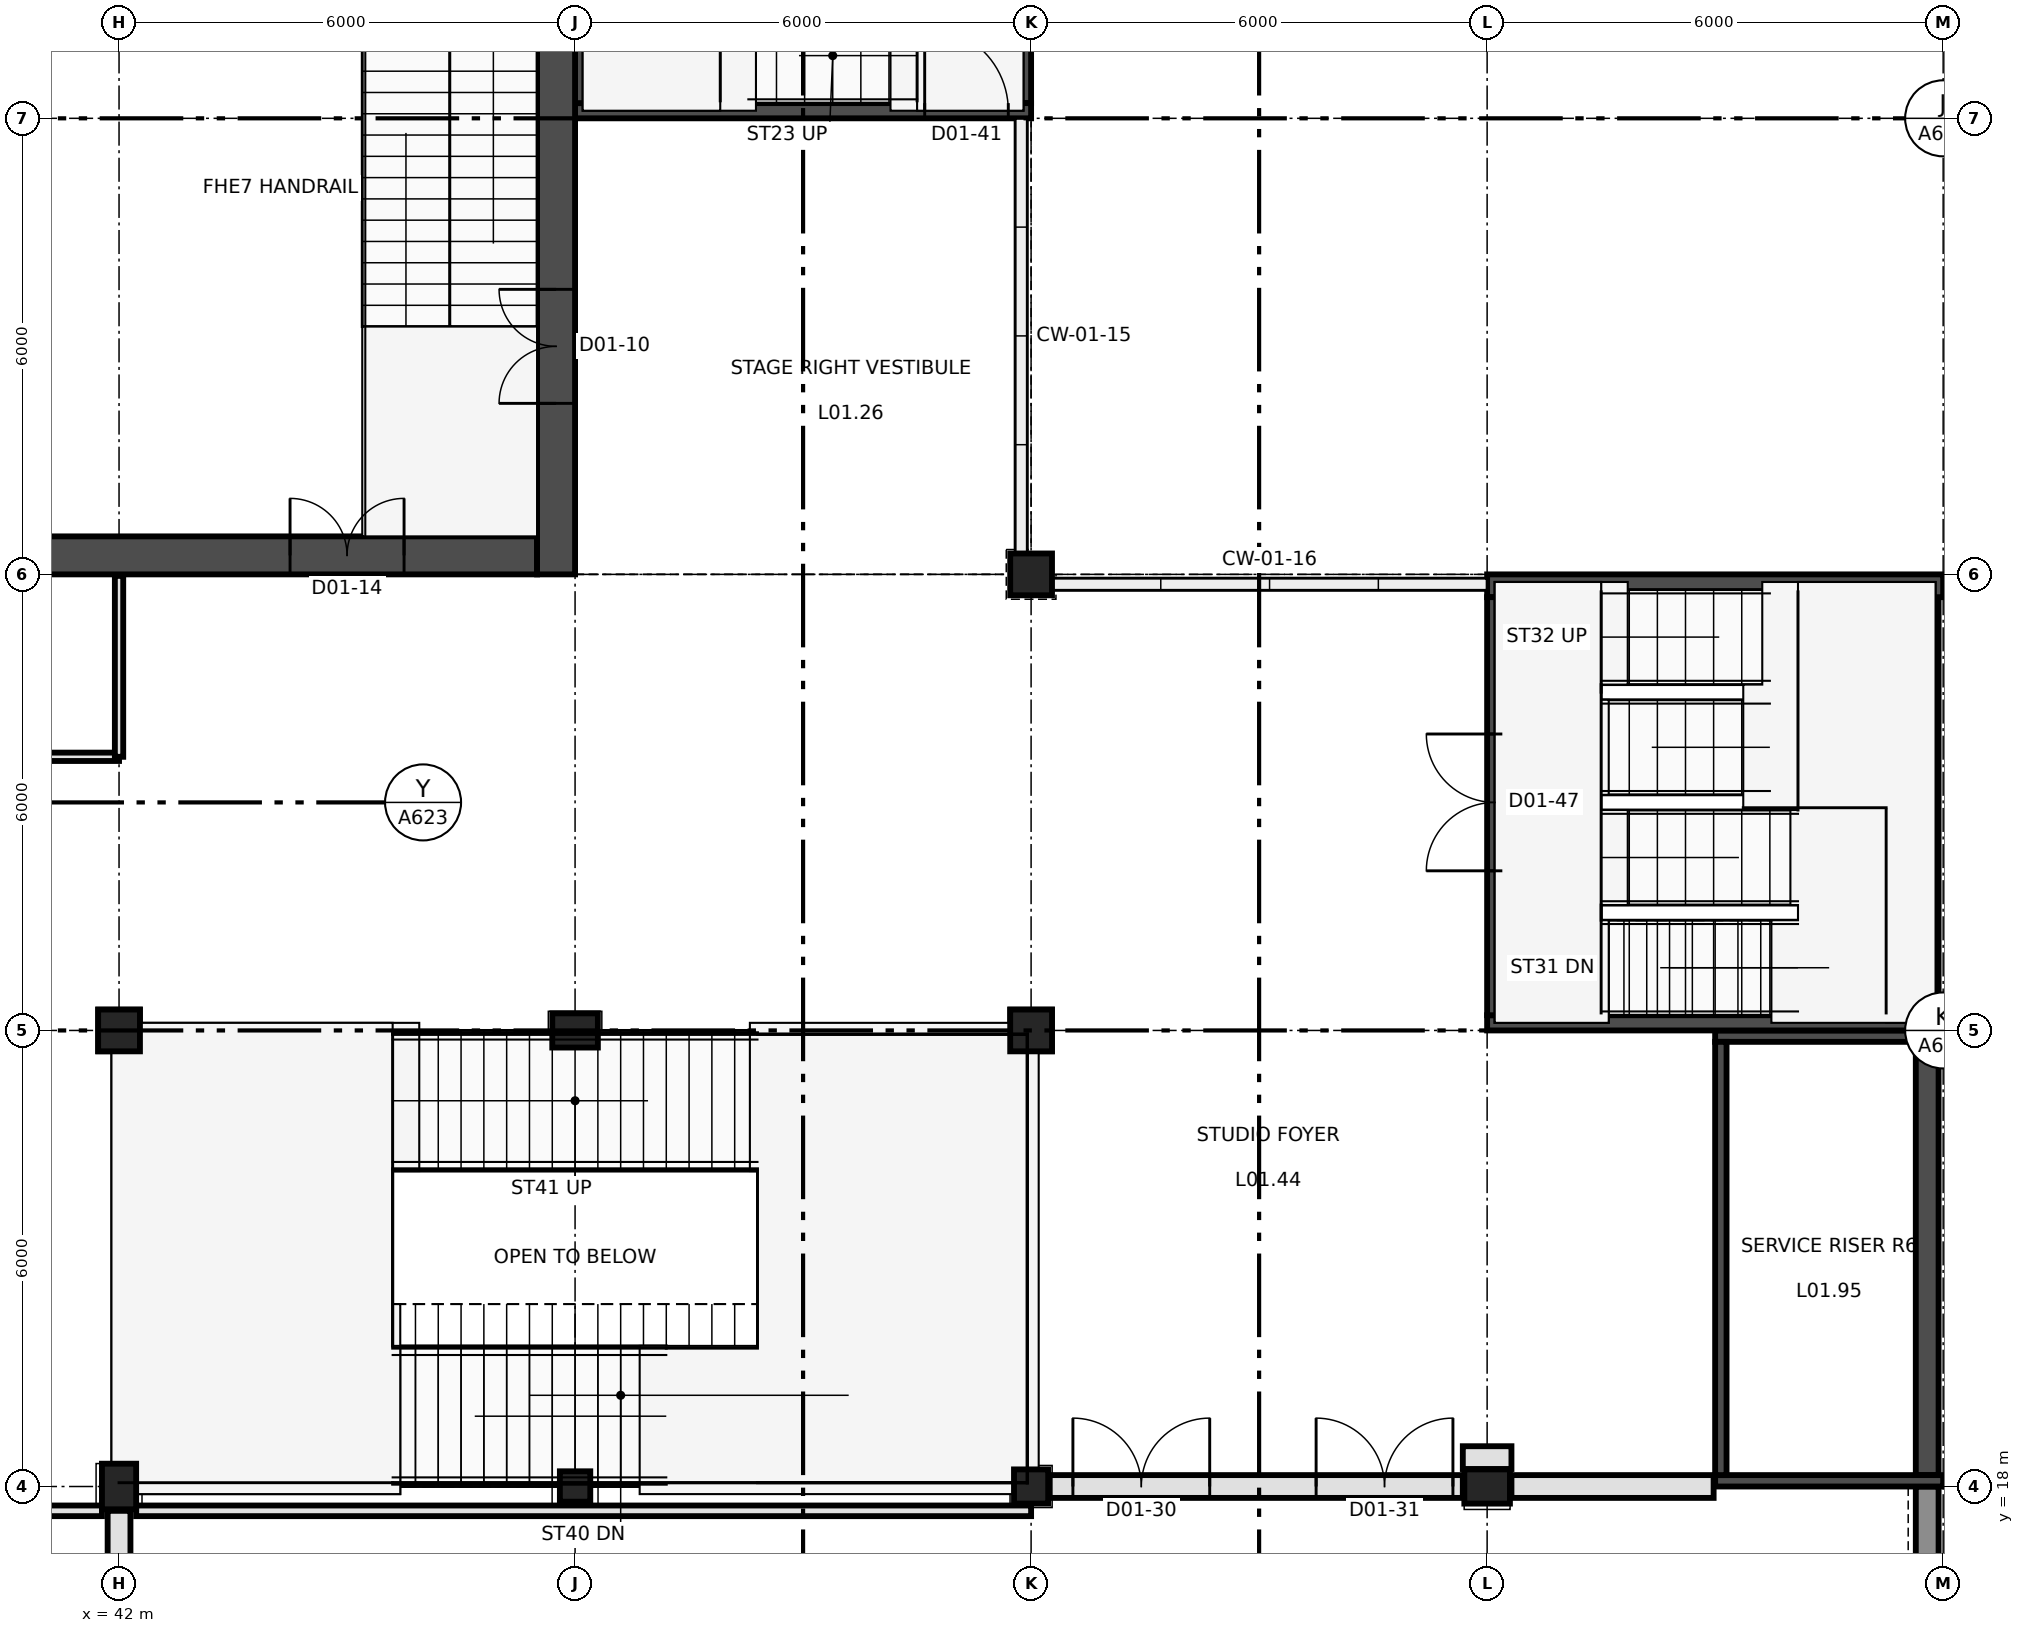
"""IFC4 building model, lengths in metres.
Left out: names, types, materials, properties, quantities, classifications, styles, units other than length and angle.
Written with IfcOpenShell. Run it as: python <this file> out.ifc"""

import sys

from ifc_helpers import new_model, si_unit, direction, frame, frame_2d, origin, origin_2d, place, context, subcontext, project, spatial, rectangle, extrude, element, fill, save


model = new_model("IFC4")
c1 = context("Model", 3, precision=1e-05, world=origin(), true_north=direction((0.0, 1.0)))
c2 = subcontext(c1, "Body", "Model", "MODEL_VIEW")
j1 = project(units=[si_unit("LENGTHUNIT", "METRE"), si_unit("PLANEANGLEUNIT", "RADIAN")], contexts=[c1])
p1 = place(None, origin())
s1 = spatial("IfcSite", under=j1, at=p1, CompositionType="ELEMENT")
p2 = place(p1, origin())
s2 = spatial("IfcBuilding", under=s1, at=p2, CompositionType="ELEMENT")
p3 = place(p2, frame((0.0, 0.0, 7.0)))
s3 = spatial("IfcBuildingStorey", under=s2, at=p3, CompositionType="ELEMENT", Elevation=7.0)
p4 = place(p3, frame((42.0, 18.0, 0.0), z_axis=(0.0, 0.0, 1.0), x_axis=(1.0, 0.0, 0.0)))
e1 = element("IfcColumn", 1, at=p4, inside=s3, PredefinedType="COLUMN", context=c2, shape_type="SweptSolid", body=[
    extrude(rectangle(XDim=0.45, YDim=0.6, at=origin_2d()), origin(), (0.0, 0.0, 1.0), 5.0),
])
p5 = place(p3, frame((48.0, 18.0, 0.0), z_axis=(0.0, 0.0, 1.0), x_axis=(1.0, 0.0, 0.0)))
e2 = element("IfcColumn", 2, at=p5, inside=s3, PredefinedType="COLUMN", context=c2, shape_type="SweptSolid", body=[
    extrude(rectangle(XDim=0.4, YDim=0.4, at=origin_2d()), origin(), (0.0, 0.0, 1.0), 5.0),
])
p6 = place(p3, frame((54.0, 18.0, 0.0), z_axis=(0.0, 0.0, 1.0), x_axis=(1.0, 0.0, 0.0)))
e3 = element("IfcColumn", 3, at=p6, inside=s3, PredefinedType="COLUMN", context=c2, shape_type="SweptSolid", body=[
    extrude(rectangle(XDim=0.45, YDim=0.45, at=origin_2d()), origin(), (0.0, 0.0, 1.0), 5.0),
])
p7 = place(p3, frame((60.0, 18.0, 0.0), z_axis=(0.0, 0.0, 1.0), x_axis=(1.0, 0.0, 0.0)))
e4 = element("IfcColumn", 4, at=p7, inside=s3, PredefinedType="COLUMN", context=c2, shape_type="SweptSolid", body=[
    extrude(rectangle(XDim=0.6, YDim=0.45, at=origin_2d()), origin(), (0.0, 0.0, 1.0), 5.0),
])
p8 = place(p3, frame((42.0, 24.0, 0.0), z_axis=(0.0, 0.0, 1.0), x_axis=(1.0, 0.0, 0.0)))
e5 = element("IfcColumn", 5, at=p8, inside=s3, PredefinedType="COLUMN", context=c2, shape_type="SweptSolid", body=[
    extrude(rectangle(XDim=0.55, YDim=0.55, at=origin_2d()), origin(), (0.0, 0.0, 1.0), 5.0),
])
p9 = place(p3, frame((48.0, 24.0, 0.0), z_axis=(0.0, 0.0, 1.0), x_axis=(1.0, 0.0, 0.0)))
e6 = element("IfcColumn", 6, at=p9, inside=s3, PredefinedType="COLUMN", context=c2, shape_type="SweptSolid", body=[
    extrude(rectangle(XDim=0.6, YDim=0.45, at=origin_2d()), origin(), (0.0, 0.0, 1.0), 5.0),
])
for number, where, z_axis, x_axis in (
    (7, (54.0, 24.0, 0.0), (0.0, 0.0, 1.0), (1.0, 0.0, 0.0)),
    (8, (54.0, 30.0, 0.0), (0.0, 0.0, 1.0), (1.0, 0.0, 0.0)),
):
    element("IfcColumn", number, at=place(p3, frame(where, z_axis=z_axis, x_axis=x_axis)), inside=s3, PredefinedType="COLUMN", context=c2, shape_type="SweptSolid", body=[
        extrude(rectangle(XDim=0.55, YDim=0.55, at=origin_2d()), origin(), (0.0, 0.0, 1.0), 5.0),
    ])
p10 = place(p3, frame((48.0, 36.1, 0.0), z_axis=(0.0, 0.0, 1.0), x_axis=(1.0, 0.0, 0.0)))
e9 = element("IfcWall", 9, at=p10, inside=s3, PredefinedType="SHEAR", context=c2, shape_type="SweptSolid", body=[
    extrude(rectangle(XDim=6.0, YDim=0.2, at=frame_2d((3.0, 0.0))), origin(), (0.0, 0.0, 1.0), 5.0),
])
p11 = place(p10, frame((4.6, 0.0, 0.0)))
e10 = element("IfcOpeningElement", 10, at=p11, cuts=e9, PredefinedType="OPENING", context=c2, shape_type="SweptSolid", body=[
    extrude(rectangle(XDim=1.1, YDim=2.2, at=frame_2d((0.55, 1.1))), frame((0.0, 0.11, 0.0), z_axis=(0.0, -1.0, 0.0), x_axis=(1.0, 0.0, 0.0)), (0.0, 0.0, 1.0), 0.22),
])
for number, where, z_axis, x_axis in (
    (11, (48.1, 36.2, 0.0), (0.0, 0.0, 1.0), (0.0, 1.0, 0.0)),
    (12, (53.9, 36.2, 0.0), (0.0, 0.0, 1.0), (0.0, 1.0, 0.0)),
):
    element("IfcWall", number, at=place(p3, frame(where, z_axis=z_axis, x_axis=x_axis)), inside=s3, PredefinedType="SHEAR", context=c2, shape_type="SweptSolid", body=[
        extrude(rectangle(XDim=5.6, YDim=0.2, at=frame_2d((2.8, 0.0))), origin(), (0.0, 0.0, 1.0), 5.0),
    ])
p12 = place(p3, frame((60.0, 29.85, 0.0), z_axis=(0.0, 0.0, 1.0), x_axis=(1.0, 0.0, 0.0)))
e13 = element("IfcWall", 13, at=p12, inside=s3, PredefinedType="SHEAR", context=c2, shape_type="SweptSolid", body=[
    extrude(rectangle(XDim=6.0, YDim=0.3, at=frame_2d((3.0, 0.0))), origin(), (0.0, 0.0, 1.0), 5.0),
])
p13 = place(p3, frame((60.0, 24.1, 0.0), z_axis=(0.0, 0.0, 1.0), x_axis=(1.0, 0.0, 0.0)))
e14 = element("IfcWall", 14, at=p13, inside=s3, PredefinedType="SHEAR", context=c2, shape_type="SweptSolid", body=[
    extrude(rectangle(XDim=6.0, YDim=0.2, at=frame_2d((3.0, 0.0))), origin(), (0.0, 0.0, 1.0), 5.0),
])
p14 = place(p3, frame((60.1, 24.2, 0.0), z_axis=(0.0, 0.0, 1.0), x_axis=(0.0, 1.0, 0.0)))
e15 = element("IfcWall", 15, at=p14, inside=s3, PredefinedType="SHEAR", context=c2, shape_type="SweptSolid", body=[
    extrude(rectangle(XDim=5.5, YDim=0.2, at=frame_2d((2.75, 0.0))), origin(), (0.0, 0.0, 1.0), 5.0),
])
p15 = place(p14, frame((1.9, 0.0, 0.0)))
e16 = element("IfcOpeningElement", 16, at=p15, cuts=e15, PredefinedType="OPENING", context=c2, shape_type="SweptSolid", body=[
    extrude(rectangle(XDim=1.8, YDim=2.2, at=frame_2d((0.9, 1.1))), frame((0.0, 0.11, 0.0), z_axis=(0.0, -1.0, 0.0), x_axis=(1.0, 0.0, 0.0)), (0.0, 0.0, 1.0), 0.22),
])
p16 = place(p3, frame((65.79, 24.2, 0.0), z_axis=(0.0, 0.0, 1.0), x_axis=(0.0, 1.0, 0.0)))
e17 = element("IfcWall", 17, at=p16, inside=s3, PredefinedType="SHEAR", context=c2, shape_type="SweptSolid", body=[
    extrude(rectangle(XDim=5.5, YDim=0.3, at=frame_2d((2.75, 0.0))), origin(), (0.0, 0.0, 1.0), 5.0),
])
for number, where, z_axis, x_axis in (
    (18, (63.0, 23.925, 0.0), (0.0, 0.0, 1.0), (1.0, 0.0, 0.0)),
    (19, (63.0, 18.075, 0.0), (0.0, 0.0, 1.0), (1.0, 0.0, 0.0)),
):
    element("IfcWall", number, at=place(p3, frame(where, z_axis=z_axis, x_axis=x_axis)), inside=s3, PredefinedType="SHEAR", context=c2, shape_type="SweptSolid", body=[
        extrude(rectangle(XDim=3.0, YDim=0.15, at=frame_2d((1.5, 0.0))), origin(), (0.0, 0.0, 1.0), 5.0),
    ])
p17 = place(p3, frame((63.075, 18.15, 0.0), z_axis=(0.0, 0.0, 1.0), x_axis=(0.0, 1.0, 0.0)))
e20 = element("IfcWall", 20, at=p17, inside=s3, PredefinedType="SHEAR", context=c2, shape_type="SweptSolid", body=[
    extrude(rectangle(XDim=5.7, YDim=0.15, at=frame_2d((2.85, 0.0))), origin(), (0.0, 0.0, 1.0), 5.0),
])
p18 = place(p3, frame((65.79, 18.15, 0.0), z_axis=(0.0, 0.0, 1.0), x_axis=(0.0, 1.0, 0.0)))
e21 = element("IfcWall", 21, at=p18, inside=s3, PredefinedType="SHEAR", context=c2, shape_type="SweptSolid", body=[
    extrude(rectangle(XDim=5.7, YDim=0.3, at=frame_2d((2.85, 0.0))), origin(), (0.0, 0.0, 1.0), 5.0),
])
p19 = place(p3, frame((65.79, 0.0, 0.0), z_axis=(0.0, 0.0, 1.0), x_axis=(0.0, 1.0, 0.0)))
e22 = element("IfcWall", 22, at=p19, inside=s3, PredefinedType="SOLIDWALL", context=c2, shape_type="SweptSolid", body=[
    extrude(rectangle(XDim=18.0, YDim=0.3, at=frame_2d((9.0, 0.0))), origin(), (0.0, 0.0, 1.0), 5.0),
])
p20 = place(p3, frame((47.75, 30.0, 0.0), z_axis=(0.0, 0.0, 1.0), x_axis=(0.0, 1.0, 0.0)))
e23 = element("IfcWall", 23, at=p20, inside=s3, PredefinedType="SHEAR", context=c2, shape_type="SweptSolid", body=[
    extrude(rectangle(XDim=24.0, YDim=0.5, at=frame_2d((12.0, 0.0))), origin(), (0.0, 0.0, 1.0), 5.0),
])
p21 = place(p20, frame((2.25, 0.0, 0.0)))
e24 = element("IfcOpeningElement", 24, at=p21, cuts=e23, PredefinedType="OPENING", context=c2, shape_type="SweptSolid", body=[
    extrude(rectangle(XDim=1.5, YDim=2.1, at=frame_2d((0.75, 1.05))), frame((0.0, 0.26, 0.0), z_axis=(0.0, -1.0, 0.0), x_axis=(1.0, 0.0, 0.0)), (0.0, 0.0, 1.0), 0.52),
])
p22 = place(p20, frame((14.25, 0.0, 0.0)))
e25 = element("IfcOpeningElement", 25, at=p22, cuts=e23, PredefinedType="OPENING", context=c2, shape_type="SweptSolid", body=[
    extrude(rectangle(XDim=1.5, YDim=2.1, at=frame_2d((0.75, 1.05))), frame((0.0, 0.26, 0.0), z_axis=(0.0, -1.0, 0.0), x_axis=(1.0, 0.0, 0.0)), (0.0, 0.0, 1.0), 0.52),
])
p23 = place(p3, frame((18.5, 30.25, 0.0), z_axis=(0.0, 0.0, 1.0), x_axis=(1.0, 0.0, 0.0)))
e26 = element("IfcWall", 26, at=p23, inside=s3, PredefinedType="SHEAR", context=c2, shape_type="SweptSolid", body=[
    extrude(rectangle(XDim=29.0, YDim=0.5, at=frame_2d((14.5, 0.0))), origin(), (0.0, 0.0, 1.0), 5.0),
])
p24 = place(p23, frame((1.25, 0.0, 0.0)))
e27 = element("IfcOpeningElement", 27, at=p24, cuts=e26, PredefinedType="OPENING", context=c2, shape_type="SweptSolid", body=[
    extrude(rectangle(XDim=2.4, YDim=3.6, at=frame_2d((1.2, 1.8))), frame((0.0, 0.26, 0.0), z_axis=(0.0, -1.0, 0.0), x_axis=(1.0, 0.0, 0.0)), (0.0, 0.0, 1.0), 0.52),
])
p25 = place(p23, frame((25.75, 0.0, 0.0)))
e28 = element("IfcOpeningElement", 28, at=p25, cuts=e26, PredefinedType="OPENING", context=c2, shape_type="SweptSolid", body=[
    extrude(rectangle(XDim=1.5, YDim=2.1, at=frame_2d((0.75, 1.05))), frame((0.0, 0.26, 0.0), z_axis=(0.0, -1.0, 0.0), x_axis=(1.0, 0.0, 0.0)), (0.0, 0.0, 1.0), 0.52),
])
p26 = place(p3, frame((54.245, 18.0, 0.0), z_axis=(0.0, 0.0, 1.0), x_axis=(1.0, 0.0, 0.0)))
e29 = element("IfcWall", 29, at=p26, inside=s3, PredefinedType="PARTITIONING", context=c2, shape_type="SweptSolid", body=[
    extrude(rectangle(XDim=5.435, YDim=0.3, at=frame_2d((2.717, 0.0))), origin(), (0.0, 0.0, 1.0), 4.1),
])
p27 = place(p26, frame((0.305, 0.0, 0.0)))
e30 = element("IfcOpeningElement", 30, at=p27, cuts=e29, PredefinedType="OPENING", context=c2, shape_type="SweptSolid", body=[
    extrude(rectangle(XDim=1.8, YDim=2.1, at=frame_2d((0.9, 1.05))), frame((0.0, 0.16, 0.0), z_axis=(0.0, -1.0, 0.0), x_axis=(1.0, 0.0, 0.0)), (0.0, 0.0, 1.0), 0.32),
])
p28 = place(p26, frame((3.505, 0.0, 0.0)))
e31 = element("IfcOpeningElement", 31, at=p28, cuts=e29, PredefinedType="OPENING", context=c2, shape_type="SweptSolid", body=[
    extrude(rectangle(XDim=1.8, YDim=2.1, at=frame_2d((0.9, 1.05))), frame((0.0, 0.16, 0.0), z_axis=(0.0, -1.0, 0.0), x_axis=(1.0, 0.0, 0.0)), (0.0, 0.0, 1.0), 0.32),
])
p29 = place(p3, frame((60.32, 18.0, 0.0), z_axis=(0.0, 0.0, 1.0), x_axis=(1.0, 0.0, 0.0)))
e32 = element("IfcWall", 32, at=p29, inside=s3, PredefinedType="PARTITIONING", context=c2, shape_type="SweptSolid", body=[
    extrude(rectangle(XDim=2.66, YDim=0.3, at=frame_2d((1.33, 0.0))), origin(), (0.0, 0.0, 1.0), 4.1),
])
p30 = place(p3, frame((59.68, 18.38, 0.0), z_axis=(0.0, 0.0, 1.0), x_axis=(1.0, 0.0, 0.0)))
e33 = element("IfcWall", 33, at=p30, inside=s3, PredefinedType="PARTITIONING", context=c2, shape_type="SweptSolid", body=[
    extrude(rectangle(XDim=0.64, YDim=0.3, at=frame_2d((0.32, 0.0))), origin(), (0.0, 0.0, 1.0), 4.1),
])
p31 = place(p3, frame((42.0, 12.32, 0.0), z_axis=(0.0, 0.0, 1.0), x_axis=(0.0, 1.0, 0.0)))
e34 = element("IfcWall", 34, at=p31, inside=s3, PredefinedType="PARTITIONING", context=c2, shape_type="SweptSolid", body=[
    extrude(rectangle(XDim=5.36, YDim=0.3, at=frame_2d((2.68, 0.0))), origin(), (0.0, 0.0, 1.0), 4.1),
])
p32 = place(p31, frame((1.73, 0.0, 0.0)))
e35 = element("IfcOpeningElement", 35, at=p32, cuts=e34, PredefinedType="OPENING", context=c2, shape_type="SweptSolid", body=[
    extrude(rectangle(XDim=1.8, YDim=2.1, at=frame_2d((0.9, 1.05))), frame((0.0, 0.16, 0.0), z_axis=(0.0, -1.0, 0.0), x_axis=(1.0, 0.0, 0.0)), (0.0, 0.0, 1.0), 0.32),
])
p33 = place(p3, frame((38.22, 27.6, 0.0), z_axis=(0.0, 0.0, 1.0), x_axis=(1.0, 0.0, 0.0)))
e36 = element("IfcWall", 36, at=p33, inside=s3, PredefinedType="PARTITIONING", context=c2, shape_type="SweptSolid", body=[
    extrude(rectangle(XDim=3.78, YDim=0.11, at=frame_2d((1.89, 0.0))), origin(), (0.0, 0.0, 1.0), 4.15),
])
p34 = place(p33, frame((1.53, 0.0, 0.0)))
e37 = element("IfcOpeningElement", 37, at=p34, cuts=e36, PredefinedType="OPENING", context=c2, shape_type="SweptSolid", body=[
    extrude(rectangle(XDim=0.75, YDim=2.04, at=frame_2d((0.375, 1.02))), frame((0.0, 0.065, 0.0), z_axis=(0.0, -1.0, 0.0), x_axis=(1.0, 0.0, 0.0)), (0.0, 0.0, 1.0), 0.13),
])
p35 = place(p3, frame((42.0, 27.6, 0.0), z_axis=(0.0, 0.0, 1.0), x_axis=(0.0, 1.0, 0.0)))
e38 = element("IfcWall", 38, at=p35, inside=s3, PredefinedType="PARTITIONING", context=c2, shape_type="SweptSolid", body=[
    extrude(rectangle(XDim=2.38, YDim=0.11, at=frame_2d((1.19, 0.0))), origin(), (0.0, 0.0, 1.0), 4.15),
])
p36 = place(p3, frame((36.0, 17.68, 0.0), z_axis=(0.0, 0.0, 1.0), x_axis=(1.0, 0.0, 0.0)))
e39 = element("IfcWall", 39, at=p36, inside=s3, PredefinedType="PARTITIONING", context=c2, shape_type="SweptSolid", body=[
    extrude(rectangle(XDim=5.775, YDim=0.14, at=frame_2d((2.887, 0.0))), origin(), (0.0, 0.0, 1.0), 4.1),
])
p37 = place(p3, frame((42.225, 17.68, 0.0), z_axis=(0.0, 0.0, 1.0), x_axis=(1.0, 0.0, 0.0)))
e40 = element("IfcWall", 40, at=p37, inside=s3, PredefinedType="PARTITIONING", context=c2, shape_type="SweptSolid", body=[
    extrude(rectangle(XDim=11.775, YDim=0.14, at=frame_2d((5.887, 0.0))), origin(), (0.0, 0.0, 1.0), 5.0),
])
p38 = place(p21, frame((1.5, 0.0, 0.0), z_axis=(0.0, 0.0, 1.0), x_axis=(-1.0, 0.0, 0.0)))
e41 = element("IfcDoor", 41, at=p38, inside=s3, OperationType="DOUBLE_DOOR_SINGLE_SWING", PredefinedType="DOOR", context=c2, shape_type="SweptSolid", body=[
    extrude(rectangle(XDim=1.5, YDim=2.1, at=frame_2d((0.75, 1.05))), frame((0.0, 0.025, 0.0), z_axis=(0.0, -1.0, 0.0), x_axis=(1.0, 0.0, 0.0)), (0.0, 0.0, 1.0), 0.05),
])
fill(e24, e41)
p39 = place(p25, frame((1.5, 0.0, 0.0), z_axis=(0.0, 0.0, 1.0), x_axis=(-1.0, 0.0, 0.0)))
e42 = element("IfcDoor", 42, at=p39, inside=s3, OperationType="DOUBLE_DOOR_SINGLE_SWING", PredefinedType="DOOR", context=c2, shape_type="SweptSolid", body=[
    extrude(rectangle(XDim=1.5, YDim=2.1, at=frame_2d((0.75, 1.05))), frame((0.0, 0.025, 0.0), z_axis=(0.0, -1.0, 0.0), x_axis=(1.0, 0.0, 0.0)), (0.0, 0.0, 1.0), 0.05),
])
fill(e28, e42)
p40 = place(p27, origin())
e43 = element("IfcDoor", 43, at=p40, inside=s3, OperationType="DOUBLE_DOOR_SINGLE_SWING", PredefinedType="DOOR", context=c2, shape_type="SweptSolid", body=[
    extrude(rectangle(XDim=1.8, YDim=2.1, at=frame_2d((0.9, 1.05))), frame((0.0, 0.025, 0.0), z_axis=(0.0, -1.0, 0.0), x_axis=(1.0, 0.0, 0.0)), (0.0, 0.0, 1.0), 0.05),
])
fill(e30, e43)
p41 = place(p28, origin())
e44 = element("IfcDoor", 44, at=p41, inside=s3, OperationType="DOUBLE_DOOR_SINGLE_SWING", PredefinedType="DOOR", context=c2, shape_type="SweptSolid", body=[
    extrude(rectangle(XDim=1.8, YDim=2.1, at=frame_2d((0.9, 1.05))), frame((0.0, 0.025, 0.0), z_axis=(0.0, -1.0, 0.0), x_axis=(1.0, 0.0, 0.0)), (0.0, 0.0, 1.0), 0.05),
])
fill(e31, e44)
p42 = place(p11, origin())
e45 = element("IfcDoor", 45, at=p42, inside=s3, OperationType="SINGLE_SWING_LEFT", PredefinedType="DOOR", context=c2, shape_type="SweptSolid", body=[
    extrude(rectangle(XDim=1.1, YDim=2.2, at=frame_2d((0.55, 1.1))), frame((0.0, 0.025, 0.0), z_axis=(0.0, -1.0, 0.0), x_axis=(1.0, 0.0, 0.0)), (0.0, 0.0, 1.0), 0.05),
])
fill(e10, e45)
p43 = place(p15, frame((1.8, 0.0, 0.0), z_axis=(0.0, 0.0, 1.0), x_axis=(-1.0, 0.0, 0.0)))
e46 = element("IfcDoor", 46, at=p43, inside=s3, OperationType="DOUBLE_DOOR_SINGLE_SWING", PredefinedType="DOOR", context=c2, shape_type="SweptSolid", body=[
    extrude(rectangle(XDim=1.8, YDim=2.2, at=frame_2d((0.9, 1.1))), frame((0.0, 0.025, 0.0), z_axis=(0.0, -1.0, 0.0), x_axis=(1.0, 0.0, 0.0)), (0.0, 0.0, 1.0), 0.05),
])
fill(e16, e46)
save(model, sys.argv[1])
